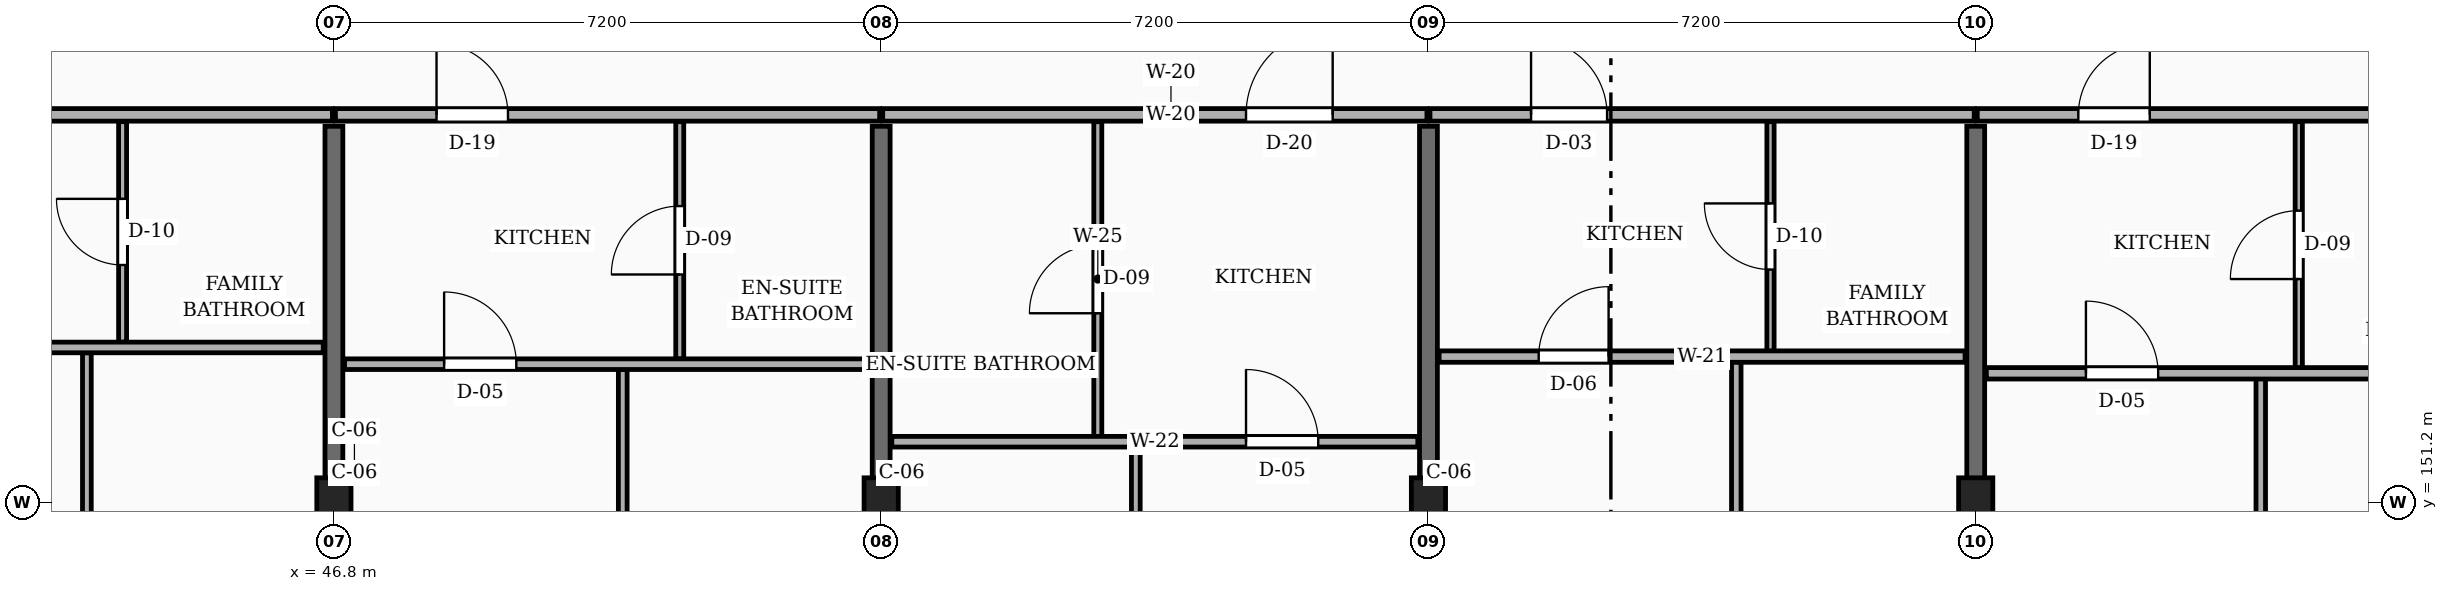
"""IFC4 building model, lengths in metres.
Left out: names, types, materials, properties, quantities, classifications, styles, units other than length and angle.
Written with IfcOpenShell. Run it as: python <this file> out.ifc"""

import sys

from ifc_helpers import new_model, si_unit, direction, frame, frame_2d, origin, origin_2d, place, context, subcontext, project, spatial, rectangle, extrude, element, fill, save


model = new_model("IFC4")
c1 = context("Model", 3, precision=1e-05, world=origin(), true_north=direction((0.0, 1.0)))
c2 = subcontext(c1, "Body", "Model", "MODEL_VIEW")
j1 = project(units=[si_unit("LENGTHUNIT", "METRE"), si_unit("PLANEANGLEUNIT", "RADIAN")], contexts=[c1])
p1 = place(None, origin())
s1 = spatial("IfcSite", under=j1, at=p1, CompositionType="ELEMENT")
p2 = place(p1, origin())
s2 = spatial("IfcBuilding", under=s1, at=p2, CompositionType="ELEMENT")
p3 = place(p2, frame((0.0, 0.0, 13.95)))
s3 = spatial("IfcBuildingStorey", under=s2, at=p3, CompositionType="ELEMENT", Elevation=13.95)
for number, where, z_axis, x_axis in (
    (1, (46.8, 151.2, 0.0), (0.0, 0.0, 1.0), (1.0, 0.0, 0.0)),
    (2, (54.0, 151.2, 0.0), (0.0, 0.0, 1.0), (1.0, 0.0, 0.0)),
    (3, (61.2, 151.2, 0.0), (0.0, 0.0, 1.0), (1.0, 0.0, 0.0)),
    (4, (68.4, 151.2, 0.0), (0.0, 0.0, 1.0), (1.0, 0.0, 0.0)),
):
    element("IfcColumn", number, at=place(p3, frame(where, z_axis=z_axis, x_axis=x_axis)), inside=s3, PredefinedType="COLUMN", context=c2, shape_type="SweptSolid", body=[
        extrude(rectangle(XDim=0.45, YDim=0.65, at=origin_2d()), origin(), (0.0, 0.0, 1.0), 3.15),
    ])
for number, where, z_axis, x_axis in (
    (5, (46.8, 144.275, 0.0), (0.0, 0.0, 1.0), (0.0, 1.0, 0.0)),
    (6, (54.0, 144.275, 0.0), (0.0, 0.0, 1.0), (0.0, 1.0, 0.0)),
    (7, (61.2, 144.275, 0.0), (0.0, 0.0, 1.0), (0.0, 1.0, 0.0)),
    (8, (68.4, 144.275, 0.0), (0.0, 0.0, 1.0), (0.0, 1.0, 0.0)),
):
    element("IfcWall", number, at=place(p3, frame(where, z_axis=z_axis, x_axis=x_axis)), inside=s3, PredefinedType="SOLIDWALL", context=c2, shape_type="SweptSolid", body=[
        extrude(rectangle(XDim=11.875, YDim=0.235, at=frame_2d((5.938, 0.0))), origin(), (0.0, 0.0, 1.0), 2.185),
    ])
p4 = place(p3, frame((39.62, 156.3, 0.0), z_axis=(0.0, 0.0, 1.0), x_axis=(1.0, 0.0, 0.0)))
e9 = element("IfcWall", 9, at=p4, inside=s3, PredefinedType="PARTITIONING", context=c2, shape_type="SweptSolid", body=[
    extrude(rectangle(XDim=7.16, YDim=0.165, at=frame_2d((3.58, 0.0))), origin(), (0.0, 0.0, 1.0), 2.32),
])
p5 = place(p4, frame((1.33, 0.0, 0.0)))
e10 = element("IfcOpeningElement", 10, at=p5, cuts=e9, PredefinedType="OPENING", context=c2, shape_type="SweptSolid", body=[
    extrude(rectangle(XDim=1.0, YDim=2.15, at=frame_2d((0.5, 1.075))), frame((0.0, 0.093, 0.0), z_axis=(0.0, -1.0, 0.0), x_axis=(1.0, 0.0, 0.0)), (0.0, 0.0, 1.0), 0.185),
])
p6 = place(p3, frame((46.82, 156.3, 0.0), z_axis=(0.0, 0.0, 1.0), x_axis=(1.0, 0.0, 0.0)))
e11 = element("IfcWall", 11, at=p6, inside=s3, PredefinedType="PARTITIONING", context=c2, shape_type="SweptSolid", body=[
    extrude(rectangle(XDim=7.16, YDim=0.165, at=frame_2d((3.58, 0.0))), origin(), (0.0, 0.0, 1.0), 2.32),
])
p7 = place(p6, frame((1.33, 0.0, 0.0)))
e12 = element("IfcOpeningElement", 12, at=p7, cuts=e11, PredefinedType="OPENING", context=c2, shape_type="SweptSolid", body=[
    extrude(rectangle(XDim=0.94, YDim=2.12, at=frame_2d((0.47, 1.06))), frame((0.0, 0.093, 0.0), z_axis=(0.0, -1.0, 0.0), x_axis=(1.0, 0.0, 0.0)), (0.0, 0.0, 1.0), 0.185),
])
p8 = place(p3, frame((54.02, 156.3, 0.0), z_axis=(0.0, 0.0, 1.0), x_axis=(1.0, 0.0, 0.0)))
e13 = element("IfcWall", 13, at=p8, inside=s3, PredefinedType="PARTITIONING", context=c2, shape_type="SweptSolid", body=[
    extrude(rectangle(XDim=7.16, YDim=0.165, at=frame_2d((3.58, 0.0))), origin(), (0.0, 0.0, 1.0), 2.32),
])
p9 = place(p8, frame((4.78, 0.0, 0.0)))
e14 = element("IfcOpeningElement", 14, at=p9, cuts=e13, PredefinedType="OPENING", context=c2, shape_type="SweptSolid", body=[
    extrude(rectangle(XDim=1.14, YDim=2.18, at=frame_2d((0.57, 1.09))), frame((0.0, 0.093, 0.0), z_axis=(0.0, -1.0, 0.0), x_axis=(1.0, 0.0, 0.0)), (0.0, 0.0, 1.0), 0.185),
])
p10 = place(p3, frame((61.22, 156.3, 0.0), z_axis=(0.0, 0.0, 1.0), x_axis=(1.0, 0.0, 0.0)))
e15 = element("IfcWall", 15, at=p10, inside=s3, PredefinedType="PARTITIONING", context=c2, shape_type="SweptSolid", body=[
    extrude(rectangle(XDim=7.16, YDim=0.165, at=frame_2d((3.58, 0.0))), origin(), (0.0, 0.0, 1.0), 2.32),
])
p11 = place(p10, frame((1.33, 0.0, 0.0)))
e16 = element("IfcOpeningElement", 16, at=p11, cuts=e15, PredefinedType="OPENING", context=c2, shape_type="SweptSolid", body=[
    extrude(rectangle(XDim=1.0, YDim=2.15, at=frame_2d((0.5, 1.075))), frame((0.0, 0.093, 0.0), z_axis=(0.0, -1.0, 0.0), x_axis=(1.0, 0.0, 0.0)), (0.0, 0.0, 1.0), 0.185),
])
p12 = place(p3, frame((68.42, 156.3, 0.0), z_axis=(0.0, 0.0, 1.0), x_axis=(1.0, 0.0, 0.0)))
e17 = element("IfcWall", 17, at=p12, inside=s3, PredefinedType="PARTITIONING", context=c2, shape_type="SweptSolid", body=[
    extrude(rectangle(XDim=7.005, YDim=0.165, at=frame_2d((3.502, 0.0))), origin(), (0.0, 0.0, 1.0), 2.32),
])
p13 = place(p12, frame((1.33, 0.0, 0.0)))
e18 = element("IfcOpeningElement", 18, at=p13, cuts=e17, PredefinedType="OPENING", context=c2, shape_type="SweptSolid", body=[
    extrude(rectangle(XDim=0.94, YDim=2.12, at=frame_2d((0.47, 1.06))), frame((0.0, 0.093, 0.0), z_axis=(0.0, -1.0, 0.0), x_axis=(1.0, 0.0, 0.0)), (0.0, 0.0, 1.0), 0.185),
])
p14 = place(p3, frame((43.55, 144.175, 0.0), z_axis=(0.0, 0.0, 1.0), x_axis=(0.0, 1.0, 0.0)))
e19 = element("IfcWall", 19, at=p14, inside=s3, PredefinedType="PARTITIONING", context=c2, shape_type="SweptSolid", body=[
    extrude(rectangle(XDim=8.995, YDim=0.115, at=frame_2d((4.498, 0.0))), origin(), (0.0, 0.0, 1.0), 2.32),
])
p15 = place(p14, frame((4.058, 0.0, 0.0)))
e20 = element("IfcOpeningElement", 20, at=p15, cuts=e19, PredefinedType="OPENING", context=c2, shape_type="SweptSolid", body=[
    extrude(rectangle(XDim=0.88, YDim=2.08, at=frame_2d((0.44, 1.04))), frame((0.0, 0.067, 0.0), z_axis=(0.0, -1.0, 0.0), x_axis=(1.0, 0.0, 0.0)), (0.0, 0.0, 1.0), 0.135),
])
p16 = place(p3, frame((44.02, 153.31, 0.0), z_axis=(0.0, 0.0, 1.0), x_axis=(0.0, 1.0, 0.0)))
e21 = element("IfcWall", 21, at=p16, inside=s3, PredefinedType="PARTITIONING", context=c2, shape_type="SweptSolid", body=[
    extrude(rectangle(XDim=2.9, YDim=0.105, at=frame_2d((1.45, 0.0))), origin(), (0.0, 0.0, 1.0), 2.32),
])
p17 = place(p16, frame((1.015, 0.0, 0.0)))
e22 = element("IfcOpeningElement", 22, at=p17, cuts=e21, PredefinedType="OPENING", context=c2, shape_type="SweptSolid", body=[
    extrude(rectangle(XDim=0.87, YDim=2.05, at=frame_2d((0.435, 1.025))), frame((0.0, 0.062, 0.0), z_axis=(0.0, -1.0, 0.0), x_axis=(1.0, 0.0, 0.0)), (0.0, 0.0, 1.0), 0.125),
])
p18 = place(p3, frame((39.74, 153.24, 0.0), z_axis=(0.0, 0.0, 1.0), x_axis=(1.0, 0.0, 0.0)))
e23 = element("IfcWall", 23, at=p18, inside=s3, PredefinedType="PARTITIONING", context=c2, shape_type="SweptSolid", body=[
    extrude(rectangle(XDim=6.92, YDim=0.14, at=frame_2d((3.46, 0.0))), origin(), (0.0, 0.0, 1.0), 2.32),
])
p19 = place(p18, frame((1.31, 0.0, 0.0)))
e24 = element("IfcOpeningElement", 24, at=p19, cuts=e23, PredefinedType="OPENING", context=c2, shape_type="SweptSolid", body=[
    extrude(rectangle(XDim=0.92, YDim=2.1, at=frame_2d((0.46, 1.05))), frame((0.0, 0.08, 0.0), z_axis=(0.0, -1.0, 0.0), x_axis=(1.0, 0.0, 0.0)), (0.0, 0.0, 1.0), 0.16),
])
p20 = place(p3, frame((50.6, 144.175, 0.0), z_axis=(0.0, 0.0, 1.0), x_axis=(0.0, 1.0, 0.0)))
e25 = element("IfcWall", 25, at=p20, inside=s3, PredefinedType="PARTITIONING", context=c2, shape_type="SweptSolid", body=[
    extrude(rectangle(XDim=8.775, YDim=0.115, at=frame_2d((4.387, 0.0))), origin(), (0.0, 0.0, 1.0), 2.32),
])
p21 = place(p20, frame((3.938, 0.0, 0.0)))
e26 = element("IfcOpeningElement", 26, at=p21, cuts=e25, PredefinedType="OPENING", context=c2, shape_type="SweptSolid", body=[
    extrude(rectangle(XDim=0.9, YDim=2.1, at=frame_2d((0.45, 1.05))), frame((0.0, 0.067, 0.0), z_axis=(0.0, -1.0, 0.0), x_axis=(1.0, 0.0, 0.0)), (0.0, 0.0, 1.0), 0.135),
])
p22 = place(p3, frame((51.35, 153.09, 0.0), z_axis=(0.0, 0.0, 1.0), x_axis=(0.0, 1.0, 0.0)))
e27 = element("IfcWall", 27, at=p22, inside=s3, PredefinedType="PARTITIONING", context=c2, shape_type="SweptSolid", body=[
    extrude(rectangle(XDim=3.12, YDim=0.105, at=frame_2d((1.56, 0.0))), origin(), (0.0, 0.0, 1.0), 2.32),
])
p23 = place(p22, frame((1.11, 0.0, 0.0)))
e28 = element("IfcOpeningElement", 28, at=p23, cuts=e27, PredefinedType="OPENING", context=c2, shape_type="SweptSolid", body=[
    extrude(rectangle(XDim=0.9, YDim=2.05, at=frame_2d((0.45, 1.025))), frame((0.0, 0.062, 0.0), z_axis=(0.0, -1.0, 0.0), x_axis=(1.0, 0.0, 0.0)), (0.0, 0.0, 1.0), 0.125),
])
p24 = place(p3, frame((46.94, 153.02, 0.0), z_axis=(0.0, 0.0, 1.0), x_axis=(1.0, 0.0, 0.0)))
e29 = element("IfcWall", 29, at=p24, inside=s3, PredefinedType="PARTITIONING", context=c2, shape_type="SweptSolid", body=[
    extrude(rectangle(XDim=6.92, YDim=0.14, at=frame_2d((3.46, 0.0))), origin(), (0.0, 0.0, 1.0), 2.32),
])
p25 = place(p24, frame((1.31, 0.0, 0.0)))
e30 = element("IfcOpeningElement", 30, at=p25, cuts=e29, PredefinedType="OPENING", context=c2, shape_type="SweptSolid", body=[
    extrude(rectangle(XDim=0.95, YDim=2.1, at=frame_2d((0.475, 1.05))), frame((0.0, 0.08, 0.0), z_axis=(0.0, -1.0, 0.0), x_axis=(1.0, 0.0, 0.0)), (0.0, 0.0, 1.0), 0.16),
])
p26 = place(p3, frame((57.35, 144.175, 0.0), z_axis=(0.0, 0.0, 1.0), x_axis=(0.0, 1.0, 0.0)))
e31 = element("IfcWall", 31, at=p26, inside=s3, PredefinedType="PARTITIONING", context=c2, shape_type="SweptSolid", body=[
    extrude(rectangle(XDim=7.755, YDim=0.115, at=frame_2d((3.877, 0.0))), origin(), (0.0, 0.0, 1.0), 2.32),
])
p27 = place(p26, frame((3.427, 0.0, 0.0)))
e32 = element("IfcOpeningElement", 32, at=p27, cuts=e31, PredefinedType="OPENING", context=c2, shape_type="SweptSolid", body=[
    extrude(rectangle(XDim=0.9, YDim=2.1, at=frame_2d((0.45, 1.05))), frame((0.0, 0.067, 0.0), z_axis=(0.0, -1.0, 0.0), x_axis=(1.0, 0.0, 0.0)), (0.0, 0.0, 1.0), 0.135),
])
p28 = place(p3, frame((56.85, 152.07, 0.0), z_axis=(0.0, 0.0, 1.0), x_axis=(0.0, 1.0, 0.0)))
e33 = element("IfcWall", 33, at=p28, inside=s3, PredefinedType="PARTITIONING", context=c2, shape_type="SweptSolid", body=[
    extrude(rectangle(XDim=4.14, YDim=0.105, at=frame_2d((2.07, 0.0))), origin(), (0.0, 0.0, 1.0), 2.32),
])
p29 = place(p28, frame((1.62, 0.0, 0.0)))
e34 = element("IfcOpeningElement", 34, at=p29, cuts=e33, PredefinedType="OPENING", context=c2, shape_type="SweptSolid", body=[
    extrude(rectangle(XDim=0.9, YDim=2.05, at=frame_2d((0.45, 1.025))), frame((0.0, 0.062, 0.0), z_axis=(0.0, -1.0, 0.0), x_axis=(1.0, 0.0, 0.0)), (0.0, 0.0, 1.0), 0.125),
])
p30 = place(p3, frame((54.14, 152.0, 0.0), z_axis=(0.0, 0.0, 1.0), x_axis=(1.0, 0.0, 0.0)))
e35 = element("IfcWall", 35, at=p30, inside=s3, PredefinedType="PARTITIONING", context=c2, shape_type="SweptSolid", body=[
    extrude(rectangle(XDim=6.92, YDim=0.14, at=frame_2d((3.46, 0.0))), origin(), (0.0, 0.0, 1.0), 2.32),
])
p31 = place(p30, frame((4.66, 0.0, 0.0)))
e36 = element("IfcOpeningElement", 36, at=p31, cuts=e35, PredefinedType="OPENING", context=c2, shape_type="SweptSolid", body=[
    extrude(rectangle(XDim=0.95, YDim=2.1, at=frame_2d((0.475, 1.05))), frame((0.0, 0.08, 0.0), z_axis=(0.0, -1.0, 0.0), x_axis=(1.0, 0.0, 0.0)), (0.0, 0.0, 1.0), 0.16),
])
p32 = place(p3, frame((65.25, 144.175, 0.0), z_axis=(0.0, 0.0, 1.0), x_axis=(0.0, 1.0, 0.0)))
e37 = element("IfcWall", 37, at=p32, inside=s3, PredefinedType="PARTITIONING", context=c2, shape_type="SweptSolid", body=[
    extrude(rectangle(XDim=8.875, YDim=0.125, at=frame_2d((4.438, 0.0))), origin(), (0.0, 0.0, 1.0), 2.32),
])
p33 = place(p32, frame((3.998, 0.0, 0.0)))
e38 = element("IfcOpeningElement", 38, at=p33, cuts=e37, PredefinedType="OPENING", context=c2, shape_type="SweptSolid", body=[
    extrude(rectangle(XDim=0.88, YDim=2.08, at=frame_2d((0.44, 1.04))), frame((0.0, 0.073, 0.0), z_axis=(0.0, -1.0, 0.0), x_axis=(1.0, 0.0, 0.0)), (0.0, 0.0, 1.0), 0.145),
])
p34 = place(p3, frame((65.7, 153.19, 0.0), z_axis=(0.0, 0.0, 1.0), x_axis=(0.0, 1.0, 0.0)))
e39 = element("IfcWall", 39, at=p34, inside=s3, PredefinedType="PARTITIONING", context=c2, shape_type="SweptSolid", body=[
    extrude(rectangle(XDim=3.02, YDim=0.095, at=frame_2d((1.51, 0.0))), origin(), (0.0, 0.0, 1.0), 2.32),
])
p35 = place(p34, frame((1.075, 0.0, 0.0)))
e40 = element("IfcOpeningElement", 40, at=p35, cuts=e39, PredefinedType="OPENING", context=c2, shape_type="SweptSolid", body=[
    extrude(rectangle(XDim=0.87, YDim=2.05, at=frame_2d((0.435, 1.025))), frame((0.0, 0.058, 0.0), z_axis=(0.0, -1.0, 0.0), x_axis=(1.0, 0.0, 0.0)), (0.0, 0.0, 1.0), 0.115),
])
p36 = place(p3, frame((61.34, 153.12, 0.0), z_axis=(0.0, 0.0, 1.0), x_axis=(1.0, 0.0, 0.0)))
e41 = element("IfcWall", 41, at=p36, inside=s3, PredefinedType="PARTITIONING", context=c2, shape_type="SweptSolid", body=[
    extrude(rectangle(XDim=6.92, YDim=0.15, at=frame_2d((3.46, 0.0))), origin(), (0.0, 0.0, 1.0), 2.32),
])
p37 = place(p36, frame((1.31, 0.0, 0.0)))
e42 = element("IfcOpeningElement", 42, at=p37, cuts=e41, PredefinedType="OPENING", context=c2, shape_type="SweptSolid", body=[
    extrude(rectangle(XDim=0.92, YDim=2.1, at=frame_2d((0.46, 1.05))), frame((0.0, 0.085, 0.0), z_axis=(0.0, -1.0, 0.0), x_axis=(1.0, 0.0, 0.0)), (0.0, 0.0, 1.0), 0.17),
])
p38 = place(p3, frame((72.15, 144.175, 0.0), z_axis=(0.0, 0.0, 1.0), x_axis=(0.0, 1.0, 0.0)))
e43 = element("IfcWall", 43, at=p38, inside=s3, PredefinedType="PARTITIONING", context=c2, shape_type="SweptSolid", body=[
    extrude(rectangle(XDim=8.655, YDim=0.125, at=frame_2d((4.328, 0.0))), origin(), (0.0, 0.0, 1.0), 2.32),
])
p39 = place(p38, frame((3.877, 0.0, 0.0)))
e44 = element("IfcOpeningElement", 44, at=p39, cuts=e43, PredefinedType="OPENING", context=c2, shape_type="SweptSolid", body=[
    extrude(rectangle(XDim=0.9, YDim=2.1, at=frame_2d((0.45, 1.05))), frame((0.0, 0.073, 0.0), z_axis=(0.0, -1.0, 0.0), x_axis=(1.0, 0.0, 0.0)), (0.0, 0.0, 1.0), 0.145),
])
p40 = place(p3, frame((72.65, 152.97, 0.0), z_axis=(0.0, 0.0, 1.0), x_axis=(0.0, 1.0, 0.0)))
e45 = element("IfcWall", 45, at=p40, inside=s3, PredefinedType="PARTITIONING", context=c2, shape_type="SweptSolid", body=[
    extrude(rectangle(XDim=3.24, YDim=0.095, at=frame_2d((1.62, 0.0))), origin(), (0.0, 0.0, 1.0), 2.32),
])
p41 = place(p40, frame((1.17, 0.0, 0.0)))
e46 = element("IfcOpeningElement", 46, at=p41, cuts=e45, PredefinedType="OPENING", context=c2, shape_type="SweptSolid", body=[
    extrude(rectangle(XDim=0.9, YDim=2.05, at=frame_2d((0.45, 1.025))), frame((0.0, 0.058, 0.0), z_axis=(0.0, -1.0, 0.0), x_axis=(1.0, 0.0, 0.0)), (0.0, 0.0, 1.0), 0.115),
])
p42 = place(p3, frame((68.54, 152.9, 0.0), z_axis=(0.0, 0.0, 1.0), x_axis=(1.0, 0.0, 0.0)))
e47 = element("IfcWall", 47, at=p42, inside=s3, PredefinedType="PARTITIONING", context=c2, shape_type="SweptSolid", body=[
    extrude(rectangle(XDim=6.885, YDim=0.15, at=frame_2d((3.442, 0.0))), origin(), (0.0, 0.0, 1.0), 2.32),
])
p43 = place(p42, frame((1.31, 0.0, 0.0)))
e48 = element("IfcOpeningElement", 48, at=p43, cuts=e47, PredefinedType="OPENING", context=c2, shape_type="SweptSolid", body=[
    extrude(rectangle(XDim=0.95, YDim=2.1, at=frame_2d((0.475, 1.05))), frame((0.0, 0.085, 0.0), z_axis=(0.0, -1.0, 0.0), x_axis=(1.0, 0.0, 0.0)), (0.0, 0.0, 1.0), 0.17),
])
p44 = place(p7, origin())
e49 = element("IfcDoor", 49, at=p44, inside=s3, OperationType="SINGLE_SWING_LEFT", PredefinedType="DOOR", context=c2, shape_type="SweptSolid", body=[
    extrude(rectangle(XDim=0.94, YDim=2.12, at=frame_2d((0.47, 1.06))), frame((0.0, 0.025, 0.0), z_axis=(0.0, -1.0, 0.0), x_axis=(1.0, 0.0, 0.0)), (0.0, 0.0, 1.0), 0.05),
])
fill(e12, e49)
p45 = place(p9, origin())
e50 = element("IfcDoor", 50, at=p45, inside=s3, OperationType="SINGLE_SWING_RIGHT", PredefinedType="DOOR", context=c2, shape_type="SweptSolid", body=[
    extrude(rectangle(XDim=1.14, YDim=2.18, at=frame_2d((0.57, 1.09))), frame((0.0, 0.025, 0.0), z_axis=(0.0, -1.0, 0.0), x_axis=(1.0, 0.0, 0.0)), (0.0, 0.0, 1.0), 0.05),
])
fill(e14, e50)
p46 = place(p11, origin())
e51 = element("IfcDoor", 51, at=p46, inside=s3, OperationType="SINGLE_SWING_LEFT", PredefinedType="DOOR", context=c2, shape_type="SweptSolid", body=[
    extrude(rectangle(XDim=1.0, YDim=2.15, at=frame_2d((0.5, 1.075))), frame((0.0, 0.025, 0.0), z_axis=(0.0, -1.0, 0.0), x_axis=(1.0, 0.0, 0.0)), (0.0, 0.0, 1.0), 0.05),
])
fill(e16, e51)
p47 = place(p13, origin())
e52 = element("IfcDoor", 52, at=p47, inside=s3, OperationType="SINGLE_SWING_RIGHT", PredefinedType="DOOR", context=c2, shape_type="SweptSolid", body=[
    extrude(rectangle(XDim=0.94, YDim=2.12, at=frame_2d((0.47, 1.06))), frame((0.0, 0.025, 0.0), z_axis=(0.0, -1.0, 0.0), x_axis=(1.0, 0.0, 0.0)), (0.0, 0.0, 1.0), 0.05),
])
fill(e18, e52)
p48 = place(p17, origin())
e53 = element("IfcDoor", 53, at=p48, inside=s3, OperationType="SINGLE_SWING_RIGHT", PredefinedType="DOOR", context=c2, shape_type="SweptSolid", body=[
    extrude(rectangle(XDim=0.87, YDim=2.05, at=frame_2d((0.435, 1.025))), frame((0.0, 0.025, 0.0), z_axis=(0.0, -1.0, 0.0), x_axis=(1.0, 0.0, 0.0)), (0.0, 0.0, 1.0), 0.05),
])
fill(e22, e53)
p49 = place(p23, origin())
e54 = element("IfcDoor", 54, at=p49, inside=s3, OperationType="SINGLE_SWING_LEFT", PredefinedType="DOOR", context=c2, shape_type="SweptSolid", body=[
    extrude(rectangle(XDim=0.9, YDim=2.05, at=frame_2d((0.45, 1.025))), frame((0.0, 0.025, 0.0), z_axis=(0.0, -1.0, 0.0), x_axis=(1.0, 0.0, 0.0)), (0.0, 0.0, 1.0), 0.05),
])
fill(e28, e54)
p50 = place(p25, origin())
e55 = element("IfcDoor", 55, at=p50, inside=s3, OperationType="SINGLE_SWING_LEFT", PredefinedType="DOOR", context=c2, shape_type="SweptSolid", body=[
    extrude(rectangle(XDim=0.95, YDim=2.1, at=frame_2d((0.475, 1.05))), frame((0.0, 0.025, 0.0), z_axis=(0.0, -1.0, 0.0), x_axis=(1.0, 0.0, 0.0)), (0.0, 0.0, 1.0), 0.05),
])
fill(e30, e55)
p51 = place(p29, origin())
e56 = element("IfcDoor", 56, at=p51, inside=s3, OperationType="SINGLE_SWING_LEFT", PredefinedType="DOOR", context=c2, shape_type="SweptSolid", body=[
    extrude(rectangle(XDim=0.9, YDim=2.05, at=frame_2d((0.45, 1.025))), frame((0.0, 0.025, 0.0), z_axis=(0.0, -1.0, 0.0), x_axis=(1.0, 0.0, 0.0)), (0.0, 0.0, 1.0), 0.05),
])
fill(e34, e56)
p52 = place(p31, origin())
e57 = element("IfcDoor", 57, at=p52, inside=s3, OperationType="SINGLE_SWING_LEFT", PredefinedType="DOOR", context=c2, shape_type="SweptSolid", body=[
    extrude(rectangle(XDim=0.95, YDim=2.1, at=frame_2d((0.475, 1.05))), frame((0.0, 0.025, 0.0), z_axis=(0.0, -1.0, 0.0), x_axis=(1.0, 0.0, 0.0)), (0.0, 0.0, 1.0), 0.05),
])
fill(e36, e57)
p53 = place(p35, origin())
e58 = element("IfcDoor", 58, at=p53, inside=s3, OperationType="SINGLE_SWING_RIGHT", PredefinedType="DOOR", context=c2, shape_type="SweptSolid", body=[
    extrude(rectangle(XDim=0.87, YDim=2.05, at=frame_2d((0.435, 1.025))), frame((0.0, 0.025, 0.0), z_axis=(0.0, -1.0, 0.0), x_axis=(1.0, 0.0, 0.0)), (0.0, 0.0, 1.0), 0.05),
])
fill(e40, e58)
p54 = place(p37, origin())
e59 = element("IfcDoor", 59, at=p54, inside=s3, OperationType="SINGLE_SWING_RIGHT", PredefinedType="DOOR", context=c2, shape_type="SweptSolid", body=[
    extrude(rectangle(XDim=0.92, YDim=2.1, at=frame_2d((0.46, 1.05))), frame((0.0, 0.025, 0.0), z_axis=(0.0, -1.0, 0.0), x_axis=(1.0, 0.0, 0.0)), (0.0, 0.0, 1.0), 0.05),
])
fill(e42, e59)
p55 = place(p41, origin())
e60 = element("IfcDoor", 60, at=p55, inside=s3, OperationType="SINGLE_SWING_LEFT", PredefinedType="DOOR", context=c2, shape_type="SweptSolid", body=[
    extrude(rectangle(XDim=0.9, YDim=2.05, at=frame_2d((0.45, 1.025))), frame((0.0, 0.025, 0.0), z_axis=(0.0, -1.0, 0.0), x_axis=(1.0, 0.0, 0.0)), (0.0, 0.0, 1.0), 0.05),
])
fill(e46, e60)
p56 = place(p43, origin())
e61 = element("IfcDoor", 61, at=p56, inside=s3, OperationType="SINGLE_SWING_LEFT", PredefinedType="DOOR", context=c2, shape_type="SweptSolid", body=[
    extrude(rectangle(XDim=0.95, YDim=2.1, at=frame_2d((0.475, 1.05))), frame((0.0, 0.025, 0.0), z_axis=(0.0, -1.0, 0.0), x_axis=(1.0, 0.0, 0.0)), (0.0, 0.0, 1.0), 0.05),
])
fill(e48, e61)
save(model, sys.argv[1])
